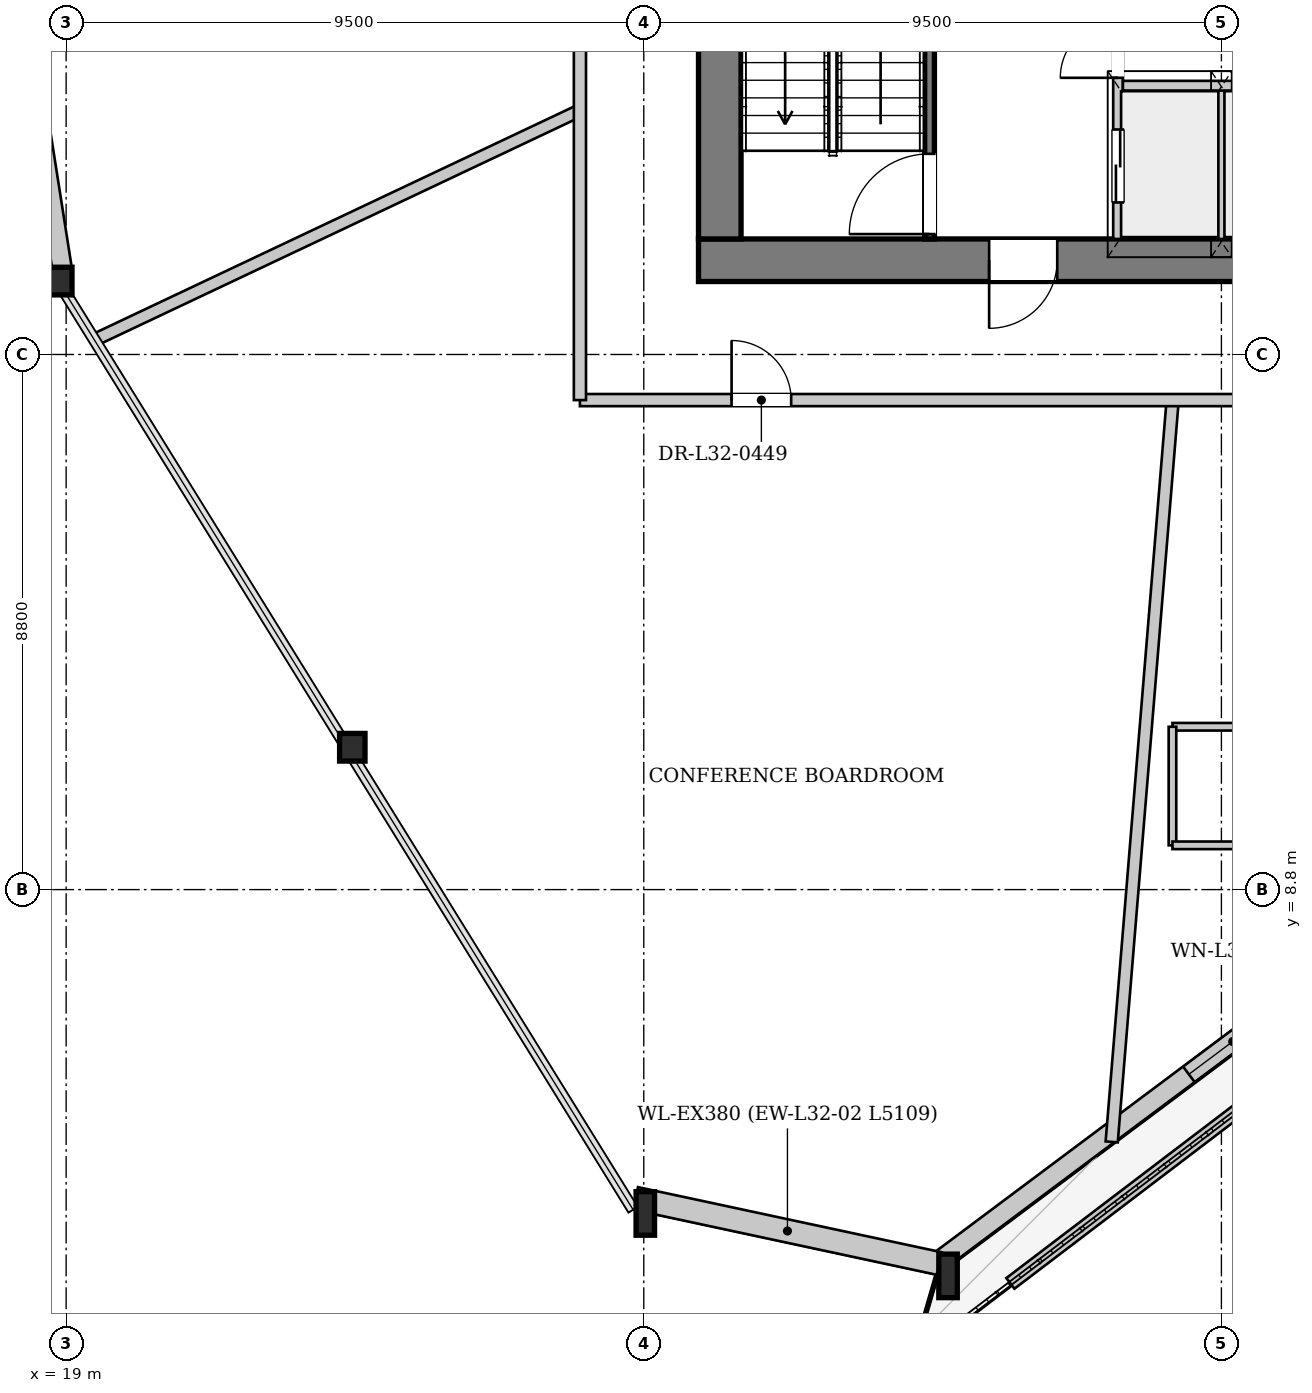
"""IFC4 building model, lengths in metres.
Left out: names, types, materials, properties, quantities, classifications, styles, units other than length and angle.
Written with IfcOpenShell. Run it as: python <this file> out.ifc"""

import sys

from ifc_helpers import new_model, si_unit, direction, frame, frame_2d, origin, origin_2d, place, context, subcontext, project, spatial, rectangle, i_section, extrude, source, transform, mapped, element, fill, save


model = new_model("IFC4")
c1 = context("Model", 3, precision=1e-05, world=origin(), true_north=direction((0.0, 1.0)))
c2 = subcontext(c1, "Body", "Model", "MODEL_VIEW")
j1 = project(units=[si_unit("LENGTHUNIT", "METRE"), si_unit("PLANEANGLEUNIT", "RADIAN")], contexts=[c1])
p1 = place(None, origin())
s1 = spatial("IfcSite", under=j1, at=p1, CompositionType="ELEMENT")
p2 = place(p1, origin())
s2 = spatial("IfcBuilding", under=s1, at=p2, CompositionType="ELEMENT")
p3 = place(p2, frame((0.0, 0.0, 123.45)))
s3 = spatial("IfcBuildingStorey", under=s2, at=p3, CompositionType="ELEMENT", Elevation=123.45)
m1 = source(origin(), c2, "Body", "SweptSolid", [
    extrude(i_section(OverallWidth=0.418, OverallDepth=0.455, WebThickness=0.038, FlangeThickness=0.059, at=origin_2d()), origin(), (0.0, 0.0, 1.0), 3.402),
])
p4 = place(p3, frame((18.783, 18.94, 0.0), z_axis=(0.061719052088, -0.078010011185, 0.995040299065), x_axis=(0.784235971921, 0.620462682476, 0.0)))
e1 = element("IfcColumn", 1, at=p4, inside=s3, PredefinedType="COLUMN", context=c2, shape_type="MappedRepresentation", body=[
    mapped(m1, transform((0.0, 0.0, 0.0), x_axis=(1.0, 0.0, 0.0), y_axis=(0.0, 1.0, 0.0), z_axis=(0.0, 0.0, 1.0), scale=1.0)),
])
m2 = source(origin(), c2, "Body", "SweptSolid", [
    extrude(i_section(OverallWidth=0.418, OverallDepth=0.455, WebThickness=0.038, FlangeThickness=0.059, at=origin_2d()), origin(), (0.0, 0.0, 1.0), 3.404),
])
p5 = place(p3, frame((23.554, 11.238, 0.0), z_axis=(0.089644841489, -0.057014119187, 0.994340581797), x_axis=(0.536657078797, 0.84380043836, 0.0)))
e2 = element("IfcColumn", 2, at=p5, inside=s3, PredefinedType="COLUMN", context=c2, shape_type="MappedRepresentation", body=[
    mapped(m2, transform((0.0, 0.0, 0.0), x_axis=(1.0, 0.0, 0.0), y_axis=(0.0, 1.0, 0.0), z_axis=(0.0, 0.0, 1.0), scale=1.0)),
])
m3 = source(origin(), c2, "Body", "SweptSolid", [
    extrude(i_section(OverallWidth=0.304, OverallDepth=0.716, WebThickness=0.021, FlangeThickness=0.04, at=origin_2d()), origin(), (0.0, 0.0, 1.0), 3.411),
])
p6 = place(p3, frame((28.325, 3.535, 0.0), z_axis=(0.117318130855, -0.035932703898, 0.99244410269), x_axis=(0.292855781386, 0.956156624884, 0.0)))
e3 = element("IfcColumn", 3, at=p6, inside=s3, PredefinedType="COLUMN", context=c2, shape_type="MappedRepresentation", body=[
    mapped(m3, transform((0.0, 0.0, 0.0), x_axis=(1.0, 0.0, 0.0), y_axis=(0.0, 1.0, 0.0), z_axis=(0.0, 0.0, 1.0), scale=1.0)),
])
m4 = source(origin(), c2, "Body", "SweptSolid", [
    extrude(i_section(OverallWidth=0.304, OverallDepth=0.716, WebThickness=0.021, FlangeThickness=0.04, at=origin_2d()), origin(), (0.0, 0.0, 1.0), 3.405),
])
p7 = place(p3, frame((33.321, 2.464, 0.0), z_axis=(0.107623996399, -0.009966512658, 0.994141712245), x_axis=(0.092210391017, 0.995739546161, 0.0)))
e4 = element("IfcColumn", 4, at=p7, inside=s3, PredefinedType="COLUMN", context=c2, shape_type="MappedRepresentation", body=[
    mapped(m4, transform((0.0, 0.0, 0.0), x_axis=(1.0, 0.0, 0.0), y_axis=(0.0, 1.0, 0.0), z_axis=(0.0, 0.0, 1.0), scale=1.0)),
])
p8 = place(p3, frame((52.305, 16.857, 0.0), z_axis=(0.0, 0.0, 1.0), x_axis=(-0.800901761672, -0.598795764974, 0.0)))
e5 = element("IfcWall", 5, at=p8, inside=s3, PredefinedType="SOLIDWALL", context=c2, shape_type="SweptSolid", body=[
    extrude(rectangle(XDim=23.823, YDim=0.32, at=frame_2d((11.911, 0.0))), origin(), (0.0, 0.0, 1.0), 2.692),
])
p9 = place(p8, frame((7.823, 0.0, 0.0)))
e6 = element("IfcOpeningElement", 6, at=p9, cuts=e5, PredefinedType="OPENING", context=c2, shape_type="SweptSolid", body=[
    extrude(rectangle(XDim=1.1, YDim=2.3, at=frame_2d((0.55, 1.15))), frame((0.0, 0.17, 0.0), z_axis=(0.0, -1.0, 0.0), x_axis=(1.0, 0.0, 0.0)), (0.0, 0.0, 1.0), 0.34),
])
p10 = place(p8, frame((16.729, 0.0, 0.372)))
e7 = element("IfcOpeningElement", 7, at=p10, cuts=e5, PredefinedType="OPENING", context=c2, shape_type="SweptSolid", body=[
    extrude(rectangle(XDim=1.8, YDim=2.2, at=frame_2d((0.9, 1.1))), frame((0.0, 0.17, 0.0), z_axis=(0.0, -1.0, 0.0), x_axis=(1.0, 0.0, 0.0)), (0.0, 0.0, 1.0), 0.34),
])
p11 = place(p8, frame((3.177, 0.0, 0.65)))
e8 = element("IfcOpeningElement", 8, at=p11, cuts=e5, PredefinedType="OPENING", context=c2, shape_type="SweptSolid", body=[
    extrude(rectangle(XDim=1.2, YDim=1.5, at=frame_2d((0.6, 0.75))), frame((0.0, 0.17, 0.0), z_axis=(0.0, -1.0, 0.0), x_axis=(1.0, 0.0, 0.0)), (0.0, 0.0, 1.0), 0.34),
])
p12 = place(p3, frame((33.361, 2.65, 0.0), z_axis=(0.0, 0.0, 1.0), x_axis=(-0.977780031058, 0.209633515602, 0.0)))
e9 = element("IfcWall", 9, at=p12, inside=s3, PredefinedType="SOLIDWALL", context=c2, shape_type="SweptSolid", body=[
    extrude(rectangle(XDim=5.109, YDim=0.38, at=frame_2d((2.555, 0.0))), origin(), (0.0, 0.0, 1.0), 2.692),
])
p13 = place(p3, frame((18.941, 18.965, 0.0), z_axis=(0.0, 0.0, 1.0), x_axis=(-0.155167584453, 0.987888162058, 0.0)))
e10 = element("IfcWall", 10, at=p13, inside=s3, PredefinedType="SOLIDWALL", context=c2, shape_type="SweptSolid", body=[
    extrude(rectangle(XDim=18.121, YDim=0.32, at=frame_2d((9.061, 0.0))), origin(), (0.0, 0.0, 1.0), 2.692),
])
p14 = place(p13, frame((5.249, 0.0, 0.0)))
e11 = element("IfcOpeningElement", 11, at=p14, cuts=e10, PredefinedType="OPENING", context=c2, shape_type="SweptSolid", body=[
    extrude(rectangle(XDim=1.1, YDim=2.3, at=frame_2d((0.55, 1.15))), frame((0.0, 0.17, 0.0), z_axis=(0.0, -1.0, 0.0), x_axis=(1.0, 0.0, 0.0)), (0.0, 0.0, 1.0), 0.34),
])
p15 = place(p13, frame((12.509, 0.0, 0.372)))
e12 = element("IfcOpeningElement", 12, at=p15, cuts=e10, PredefinedType="OPENING", context=c2, shape_type="SweptSolid", body=[
    extrude(rectangle(XDim=1.8, YDim=2.2, at=frame_2d((0.9, 1.1))), frame((0.0, 0.17, 0.0), z_axis=(0.0, -1.0, 0.0), x_axis=(1.0, 0.0, 0.0)), (0.0, 0.0, 1.0), 0.34),
])
p16 = place(p3, frame((34.529, 2.323, 0.0), z_axis=(0.0, 0.0, 1.0), x_axis=(0.795860822031, 0.605479604905, 0.0)))
e13 = element("IfcWall", 13, at=p16, inside=s3, PredefinedType="PARAPET", context=c2, shape_type="SweptSolid", body=[
    extrude(rectangle(XDim=21.175, YDim=0.22, at=frame_2d((10.587, 0.0))), origin(), (0.0, 0.0, 1.0), 0.3),
])
p17 = place(p3, frame((46.6, 19.15, 0.0), z_axis=(0.0, 0.0, 1.0), x_axis=(-1.0, 0.0, 0.0)))
e14 = element("IfcWall", 14, at=p17, inside=s3, PredefinedType="SHEAR", context=c2, shape_type="SweptSolid", body=[
    extrude(rectangle(XDim=17.2, YDim=0.7, at=frame_2d((8.6, 0.0))), origin(), (0.0, 0.0, 1.0), 3.3),
])
p18 = place(p17, frame((4.8, 0.0, 0.0)))
e15 = element("IfcOpeningElement", 15, at=p18, cuts=e14, PredefinedType="OPENING", context=c2, shape_type="SweptSolid", body=[
    extrude(rectangle(XDim=1.12, YDim=2.25, at=frame_2d((0.56, 1.125))), frame((0.0, 0.36, 0.0), z_axis=(0.0, -1.0, 0.0), x_axis=(1.0, 0.0, 0.0)), (0.0, 0.0, 1.0), 0.72),
])
p19 = place(p17, frame((11.3, 0.0, 0.0)))
e16 = element("IfcOpeningElement", 16, at=p19, cuts=e14, PredefinedType="OPENING", context=c2, shape_type="SweptSolid", body=[
    extrude(rectangle(XDim=1.12, YDim=2.25, at=frame_2d((0.56, 1.125))), frame((0.0, 0.36, 0.0), z_axis=(0.0, -1.0, 0.0), x_axis=(1.0, 0.0, 0.0)), (0.0, 0.0, 1.0), 0.72),
])
p20 = place(p3, frame((29.75, 19.5, 0.0), z_axis=(0.0, 0.0, 1.0), x_axis=(0.0, 1.0, 0.0)))
e17 = element("IfcWall", 17, at=p20, inside=s3, PredefinedType="SHEAR", context=c2, shape_type="SweptSolid", body=[
    extrude(rectangle(XDim=14.2, YDim=0.7, at=frame_2d((7.1, 0.0))), origin(), (0.0, 0.0, 1.0), 3.3),
])
p21 = place(p20, frame((7.42, 0.0, 0.0)))
e18 = element("IfcOpeningElement", 18, at=p21, cuts=e17, PredefinedType="OPENING", context=c2, shape_type="SweptSolid", body=[
    extrude(rectangle(XDim=1.6, YDim=2.2, at=frame_2d((0.8, 1.1))), frame((0.0, 0.36, 0.0), z_axis=(0.0, -1.0, 0.0), x_axis=(1.0, 0.0, 0.0)), (0.0, 0.0, 1.0), 0.72),
])
p22 = place(p3, frame((33.2, 19.5, 0.0), z_axis=(0.0, 0.0, 1.0), x_axis=(0.0, 1.0, 0.0)))
e19 = element("IfcWall", 19, at=p22, inside=s3, PredefinedType="PARTITIONING", context=c2, shape_type="SweptSolid", body=[
    extrude(rectangle(XDim=7.46, YDim=0.16, at=frame_2d((3.73, 0.0))), origin(), (0.0, 0.0, 1.0), 3.3),
])
p23 = place(p22, frame((0.08, 0.0, 0.0)))
e20 = element("IfcOpeningElement", 20, at=p23, cuts=e19, PredefinedType="OPENING", context=c2, shape_type="SweptSolid", body=[
    extrude(rectangle(XDim=1.32, YDim=2.2, at=frame_2d((0.66, 1.1))), frame((0.0, 0.09, 0.0), z_axis=(0.0, -1.0, 0.0), x_axis=(1.0, 0.0, 0.0)), (0.0, 0.0, 1.0), 0.18),
])
p24 = place(p3, frame((36.3, 19.5, 0.0), z_axis=(0.0, 0.0, 1.0), x_axis=(0.0, 1.0, 0.0)))
e21 = element("IfcWall", 21, at=p24, inside=s3, PredefinedType="PARTITIONING", context=c2, shape_type="SweptSolid", body=[
    extrude(rectangle(XDim=4.78, YDim=0.16, at=frame_2d((2.39, 0.0))), origin(), (0.0, 0.0, 1.0), 3.3),
])
p25 = place(p24, frame((0.6, 0.0, 0.0)))
e22 = element("IfcOpeningElement", 22, at=p25, cuts=e21, PredefinedType="OPENING", context=c2, shape_type="SweptSolid", body=[
    extrude(rectangle(XDim=1.2, YDim=2.2, at=frame_2d((0.6, 1.1))), frame((0.0, 0.09, 0.0), z_axis=(0.0, -1.0, 0.0), x_axis=(1.0, 0.0, 0.0)), (0.0, 0.0, 1.0), 0.18),
])
p26 = place(p24, frame((2.65, 0.0, 0.0)))
e23 = element("IfcOpeningElement", 23, at=p26, cuts=e21, PredefinedType="OPENING", context=c2, shape_type="SweptSolid", body=[
    extrude(rectangle(XDim=0.95, YDim=2.1, at=frame_2d((0.475, 1.05))), frame((0.0, 0.09, 0.0), z_axis=(0.0, -1.0, 0.0), x_axis=(1.0, 0.0, 0.0)), (0.0, 0.0, 1.0), 0.18),
])
p27 = place(p3, frame((38.0, 19.5, 0.0), z_axis=(0.0, 0.0, 1.0), x_axis=(0.0, 1.0, 0.0)))
e24 = element("IfcWall", 24, at=p27, inside=s3, PredefinedType="PARTITIONING", context=c2, shape_type="SweptSolid", body=[
    extrude(rectangle(XDim=2.46, YDim=0.125, at=frame_2d((1.23, 0.0))), origin(), (0.0, 0.0, 1.0), 3.3),
])
p28 = place(p3, frame((36.38, 22.02, 0.0), z_axis=(0.0, 0.0, 1.0), x_axis=(1.0, 0.0, 0.0)))
e25 = element("IfcWall", 25, at=p28, inside=s3, PredefinedType="PARTITIONING", context=c2, shape_type="SweptSolid", body=[
    extrude(rectangle(XDim=3.24, YDim=0.16, at=frame_2d((1.62, 0.0))), origin(), (0.0, 0.0, 1.0), 3.3),
])
p29 = place(p3, frame((27.45, 21.613, 0.0), z_axis=(0.0, 0.0, 1.0), x_axis=(-0.904088828609, -0.427344579917, 0.0)))
e26 = element("IfcWall", 26, at=p29, inside=s3, PredefinedType="PARTITIONING", context=c2, shape_type="SweptSolid", body=[
    extrude(rectangle(XDim=8.802, YDim=0.2, at=frame_2d((4.401, 0.0))), origin(), (0.0, 0.0, 1.0), 3.3),
])
p30 = place(p3, frame((37.198, 16.85, 0.0), z_axis=(0.0, 0.0, 1.0), x_axis=(-0.08193618257, -0.996637578052, 0.0)))
e27 = element("IfcWall", 27, at=p30, inside=s3, PredefinedType="PARTITIONING", context=c2, shape_type="SweptSolid", body=[
    extrude(rectangle(XDim=12.24, YDim=0.2, at=frame_2d((6.12, 0.0))), origin(), (0.0, 0.0, 1.0), 3.3),
])
p31 = place(p3, frame((39.595, 11.478, 0.0), z_axis=(0.0, 0.0, 1.0), x_axis=(-1.0, 0.0, 0.0)))
e28 = element("IfcWall", 28, at=p31, inside=s3, PredefinedType="PARTITIONING", context=c2, shape_type="SweptSolid", body=[
    extrude(rectangle(XDim=2.4, YDim=0.125, at=frame_2d((1.2, 0.0))), origin(), (0.0, 0.0, 1.0), 2.985),
])
p32 = place(p3, frame((37.195, 11.478, 0.0), z_axis=(0.0, 0.0, 1.0), x_axis=(0.0, -1.0, 0.0)))
e29 = element("IfcWall", 29, at=p32, inside=s3, PredefinedType="PARTITIONING", context=c2, shape_type="SweptSolid", body=[
    extrude(rectangle(XDim=1.95, YDim=0.125, at=frame_2d((0.975, 0.0))), origin(), (0.0, 0.0, 1.0), 3.3),
])
p33 = place(p3, frame((37.195, 9.528, 0.0), z_axis=(0.0, 0.0, 1.0), x_axis=(1.0, 0.0, 0.0)))
e30 = element("IfcWall", 30, at=p33, inside=s3, PredefinedType="PARTITIONING", context=c2, shape_type="SweptSolid", body=[
    extrude(rectangle(XDim=2.4, YDim=0.125, at=frame_2d((1.2, 0.0))), origin(), (0.0, 0.0, 1.0), 3.3),
])
p34 = place(p3, frame((27.45, 16.85, 0.0), z_axis=(0.0, 0.0, 1.0), x_axis=(1.0, 0.0, 0.0)))
e31 = element("IfcWall", 31, at=p34, inside=s3, PredefinedType="PARTITIONING", context=c2, shape_type="SweptSolid", body=[
    extrude(rectangle(XDim=21.1, YDim=0.2, at=frame_2d((10.55, 0.0))), origin(), (0.0, 0.0, 1.0), 2.985),
])
p35 = place(p34, frame((19.82, 0.0, 0.0)))
e32 = element("IfcOpeningElement", 32, at=p35, cuts=e31, PredefinedType="OPENING", context=c2, shape_type="SweptSolid", body=[
    extrude(rectangle(XDim=0.98, YDim=2.15, at=frame_2d((0.49, 1.075))), frame((0.0, 0.11, 0.0), z_axis=(0.0, -1.0, 0.0), x_axis=(1.0, 0.0, 0.0)), (0.0, 0.0, 1.0), 0.22),
])
p36 = place(p34, frame((2.494, 0.0, 0.0)))
e33 = element("IfcOpeningElement", 33, at=p36, cuts=e31, PredefinedType="OPENING", context=c2, shape_type="SweptSolid", body=[
    extrude(rectangle(XDim=0.98, YDim=2.15, at=frame_2d((0.49, 1.075))), frame((0.0, 0.11, 0.0), z_axis=(0.0, -1.0, 0.0), x_axis=(1.0, 0.0, 0.0)), (0.0, 0.0, 1.0), 0.22),
])
p37 = place(p34, frame((13.65, 0.0, 0.0)))
e34 = element("IfcOpeningElement", 34, at=p37, cuts=e31, PredefinedType="OPENING", context=c2, shape_type="SweptSolid", body=[
    extrude(rectangle(XDim=0.98, YDim=2.15, at=frame_2d((0.49, 1.075))), frame((0.0, 0.11, 0.0), z_axis=(0.0, -1.0, 0.0), x_axis=(1.0, 0.0, 0.0)), (0.0, 0.0, 1.0), 0.22),
])
p38 = place(p3, frame((27.45, 16.85, 0.0), z_axis=(0.0, 0.0, 1.0), x_axis=(0.0, 1.0, 0.0)))
e35 = element("IfcWall", 35, at=p38, inside=s3, PredefinedType="PARTITIONING", context=c2, shape_type="SweptSolid", body=[
    extrude(rectangle(XDim=19.5, YDim=0.2, at=frame_2d((9.75, 0.0))), origin(), (0.0, 0.0, 1.0), 3.3),
])
p39 = place(p38, frame((8.124, 0.0, 0.0)))
e36 = element("IfcOpeningElement", 36, at=p39, cuts=e35, PredefinedType="OPENING", context=c2, shape_type="SweptSolid", body=[
    extrude(rectangle(XDim=0.98, YDim=2.15, at=frame_2d((0.49, 1.075))), frame((0.0, 0.11, 0.0), z_axis=(0.0, -1.0, 0.0), x_axis=(1.0, 0.0, 0.0)), (0.0, 0.0, 1.0), 0.22),
])
m5 = source(origin(), c2, "Body", "SweptSolid", [
    extrude(rectangle(XDim=1.8, YDim=2.2, at=frame_2d((0.9, 1.1))), frame((0.0, 0.03, 0.0), z_axis=(0.0, -1.0, 0.0), x_axis=(1.0, 0.0, 0.0)), (0.0, 0.0, 1.0), 0.06),
])
p40 = place(p10, origin())
e37 = element("IfcWindow", 37, at=p40, inside=s3, PartitioningType="SINGLE_PANEL", PredefinedType="WINDOW", context=c2, shape_type="MappedRepresentation", body=[
    mapped(m5, transform((0.0, 0.0, 0.0), x_axis=(1.0, 0.0, 0.0), y_axis=(0.0, 1.0, 0.0), z_axis=(0.0, 0.0, 1.0), scale=1.0)),
])
fill(e7, e37)
m6 = source(origin(), c2, "Body", "SweptSolid", [
    extrude(rectangle(XDim=1.12, YDim=2.25, at=frame_2d((0.56, 1.125))), frame((0.0, 0.025, 0.0), z_axis=(0.0, -1.0, 0.0), x_axis=(1.0, 0.0, 0.0)), (0.0, 0.0, 1.0), 0.05),
])
p41 = place(p19, origin())
e38 = element("IfcDoor", 38, at=p41, inside=s3, OperationType="SINGLE_SWING_RIGHT", PredefinedType="DOOR", context=c2, shape_type="MappedRepresentation", body=[
    mapped(m6, transform((0.0, 0.0, 0.0), x_axis=(1.0, 0.0, 0.0), y_axis=(0.0, 1.0, 0.0), z_axis=(0.0, 0.0, 1.0), scale=1.0)),
])
fill(e16, e38)
m7 = source(origin(), c2, "Body", "SweptSolid", [
    extrude(rectangle(XDim=1.32, YDim=2.2, at=frame_2d((0.66, 1.1))), frame((0.0, 0.025, 0.0), z_axis=(0.0, -1.0, 0.0), x_axis=(1.0, 0.0, 0.0)), (0.0, 0.0, 1.0), 0.05),
])
p42 = place(p23, origin())
e39 = element("IfcDoor", 39, at=p42, inside=s3, OperationType="SINGLE_SWING_LEFT", PredefinedType="DOOR", context=c2, shape_type="MappedRepresentation", body=[
    mapped(m7, transform((0.0, 0.0, 0.0), x_axis=(1.0, 0.0, 0.0), y_axis=(0.0, 1.0, 0.0), z_axis=(0.0, 0.0, 1.0), scale=1.0)),
])
fill(e20, e39)
m8 = source(origin(), c2, "Body", "SweptSolid", [
    extrude(rectangle(XDim=1.2, YDim=2.2, at=frame_2d((0.6, 1.1))), frame((0.0, 0.025, 0.0), z_axis=(0.0, -1.0, 0.0), x_axis=(1.0, 0.0, 0.0)), (0.0, 0.0, 1.0), 0.05),
])
p43 = place(p25, origin())
e40 = element("IfcDoor", 40, at=p43, inside=s3, OperationType="DOUBLE_DOOR_SLIDING", PredefinedType="DOOR", context=c2, shape_type="MappedRepresentation", body=[
    mapped(m8, transform((0.0, 0.0, 0.0), x_axis=(1.0, 0.0, 0.0), y_axis=(0.0, 1.0, 0.0), z_axis=(0.0, 0.0, 1.0), scale=1.0)),
])
fill(e22, e40)
m9 = source(origin(), c2, "Body", "SweptSolid", [
    extrude(rectangle(XDim=0.95, YDim=2.1, at=frame_2d((0.475, 1.05))), frame((0.0, 0.025, 0.0), z_axis=(0.0, -1.0, 0.0), x_axis=(1.0, 0.0, 0.0)), (0.0, 0.0, 1.0), 0.05),
])
p44 = place(p26, origin())
e41 = element("IfcDoor", 41, at=p44, inside=s3, OperationType="SINGLE_SWING_LEFT", PredefinedType="DOOR", context=c2, shape_type="MappedRepresentation", body=[
    mapped(m9, transform((0.0, 0.0, 0.0), x_axis=(1.0, 0.0, 0.0), y_axis=(0.0, 1.0, 0.0), z_axis=(0.0, 0.0, 1.0), scale=1.0)),
])
fill(e23, e41)
m10 = source(origin(), c2, "Body", "SweptSolid", [
    extrude(rectangle(XDim=0.98, YDim=2.15, at=frame_2d((0.49, 1.075))), frame((0.0, 0.025, 0.0), z_axis=(0.0, -1.0, 0.0), x_axis=(1.0, 0.0, 0.0)), (0.0, 0.0, 1.0), 0.05),
])
p45 = place(p36, origin())
e42 = element("IfcDoor", 42, at=p45, inside=s3, OperationType="SINGLE_SWING_LEFT", PredefinedType="DOOR", context=c2, shape_type="MappedRepresentation", body=[
    mapped(m10, transform((0.0, 0.0, 0.0), x_axis=(1.0, 0.0, 0.0), y_axis=(0.0, 1.0, 0.0), z_axis=(0.0, 0.0, 1.0), scale=1.0)),
])
fill(e33, e42)
save(model, sys.argv[1])
